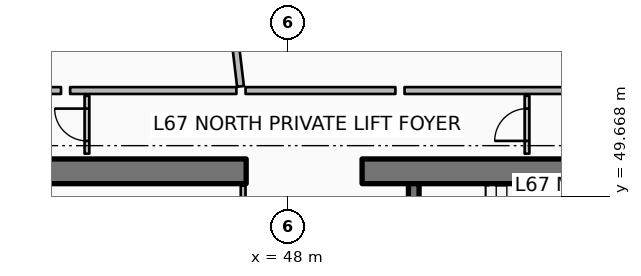
"""IFC4 building model, lengths in metres.
Left out: names, types, materials, properties, quantities, classifications, styles, units other than length and angle.
Written with IfcOpenShell. Run it as: python <this file> out.ifc"""

import sys

from ifc_helpers import new_model, si_unit, direction, frame, frame_2d, origin, place, context, subcontext, project, spatial, rectangle, extrude, element, fill, save


model = new_model("IFC4")
c1 = context("Model", 3, precision=1e-05, world=origin(), true_north=direction((0.0, 1.0)))
c2 = subcontext(c1, "Body", "Model", "MODEL_VIEW")
j1 = project(units=[si_unit("LENGTHUNIT", "METRE"), si_unit("PLANEANGLEUNIT", "RADIAN")], contexts=[c1])
p1 = place(None, origin())
s1 = spatial("IfcSite", under=j1, at=p1, CompositionType="ELEMENT")
p2 = place(p1, origin())
s2 = spatial("IfcBuilding", under=s1, at=p2, CompositionType="ELEMENT")
p3 = place(p2, frame((0.0, 0.0, 267.5)))
s3 = spatial("IfcBuildingStorey", under=s2, at=p3, CompositionType="ELEMENT", Elevation=267.5)
for number, where, z_axis, x_axis in (
    (1, (37.15, 50.325, 0.0), (0.0, 0.0, 1.0), (1.0, 0.0, 0.0)),
    (2, (49.95, 50.325, 0.0), (0.0, 0.0, 1.0), (1.0, 0.0, 0.0)),
):
    element("IfcWall", number, at=place(p3, frame(where, z_axis=z_axis, x_axis=x_axis)), inside=s3, PredefinedType="SHEAR", context=c2, shape_type="SweptSolid", body=[
        extrude(rectangle(XDim=9.75, YDim=0.65, at=frame_2d((4.875, 0.0))), origin(), (0.0, 0.0, 1.0), 3.85),
    ])
p4 = place(p3, frame((51.31, 46.5, 0.0), z_axis=(0.0, 0.0, 1.0), x_axis=(0.0, 1.0, 0.0)))
e3 = element("IfcWall", 3, at=p4, inside=s3, PredefinedType="SHEAR", context=c2, shape_type="SweptSolid", body=[
    extrude(rectangle(XDim=3.5, YDim=0.28, at=frame_2d((1.75, 0.0))), origin(), (0.0, 0.0, 1.0), 3.85),
])
p5 = place(p3, frame((46.82, 47.92, 0.0), z_axis=(0.0, 0.0, 1.0), x_axis=(0.0, 1.0, 0.0)))
e4 = element("IfcWall", 4, at=p5, inside=s3, PredefinedType="PARTITIONING", context=c2, shape_type="SweptSolid", body=[
    extrude(rectangle(XDim=2.03, YDim=0.125, at=frame_2d((1.015, 0.0))), origin(), (0.0, 0.0, 1.0), 3.03),
])
p6 = place(p3, frame((42.71, 50.79, 0.0), z_axis=(0.0, 0.0, 1.0), x_axis=(0.0, 1.0, 0.0)))
e5 = element("IfcWall", 5, at=p6, inside=s3, PredefinedType="PARTITIONING", context=c2, shape_type="SweptSolid", body=[
    extrude(rectangle(XDim=1.52, YDim=0.125, at=frame_2d((0.76, 0.0))), origin(), (0.0, 0.0, 1.0), 2.957),
])
p7 = place(p6, frame((0.335, 0.0, 0.0)))
e6 = element("IfcOpeningElement", 6, at=p7, cuts=e5, PredefinedType="OPENING", context=c2, shape_type="SweptSolid", body=[
    extrude(rectangle(XDim=0.85, YDim=2.06, at=frame_2d((0.425, 1.03))), frame((0.0, 0.073, 0.0), z_axis=(0.0, -1.0, 0.0), x_axis=(1.0, 0.0, 0.0)), (0.0, 0.0, 1.0), 0.145),
])
p8 = place(p3, frame((54.29, 50.79, 0.0), z_axis=(0.0, 0.0, 1.0), x_axis=(0.0, 1.0, 0.0)))
e7 = element("IfcWall", 7, at=p8, inside=s3, PredefinedType="PARTITIONING", context=c2, shape_type="SweptSolid", body=[
    extrude(rectangle(XDim=1.52, YDim=0.125, at=frame_2d((0.76, 0.0))), origin(), (0.0, 0.0, 1.0), 3.03),
])
p9 = place(p8, frame((0.335, 0.0, 0.0)))
e8 = element("IfcOpeningElement", 8, at=p9, cuts=e7, PredefinedType="OPENING", context=c2, shape_type="SweptSolid", body=[
    extrude(rectangle(XDim=0.85, YDim=2.06, at=frame_2d((0.425, 1.03))), frame((0.0, 0.073, 0.0), z_axis=(0.0, -1.0, 0.0), x_axis=(1.0, 0.0, 0.0)), (0.0, 0.0, 1.0), 0.145),
])
p10 = place(p3, frame((46.75, 52.559, 0.0), z_axis=(0.0, 0.0, 1.0), x_axis=(-0.117540318076, 0.993068111273, 0.0)))
e9 = element("IfcWall", 9, at=p10, inside=s3, PredefinedType="PARTITIONING", context=c2, shape_type="SweptSolid", body=[
    extrude(rectangle(XDim=14.062, YDim=0.18, at=frame_2d((7.031, 0.0))), origin(), (0.0, 0.0, 1.0), 2.957),
])
p11 = place(p3, frame((46.643, 52.45, 0.0), z_axis=(0.0, 0.0, 1.0), x_axis=(-1.0, 0.0, 0.0)))
e10 = element("IfcWall", 10, at=p11, inside=s3, PredefinedType="PARTITIONING", context=c2, shape_type="SweptSolid", body=[
    extrude(rectangle(XDim=4.376, YDim=0.18, at=frame_2d((2.188, 0.0))), origin(), (0.0, 0.0, 1.0), 2.957),
])
p12 = place(p3, frame((42.028, 52.45, 0.0), z_axis=(0.0, 0.0, 1.0), x_axis=(-1.0, 0.0, 0.0)))
e11 = element("IfcWall", 11, at=p12, inside=s3, PredefinedType="PARTITIONING", context=c2, shape_type="SweptSolid", body=[
    extrude(rectangle(XDim=4.758, YDim=0.18, at=frame_2d((2.379, 0.0))), origin(), (0.0, 0.0, 1.0), 2.957),
])
p13 = place(p3, frame((56.118, 52.45, 0.0), z_axis=(0.0, 0.0, 1.0), x_axis=(-1.0, 0.0, 0.0)))
e12 = element("IfcWall", 12, at=p13, inside=s3, PredefinedType="PARTITIONING", context=c2, shape_type="SweptSolid", body=[
    extrude(rectangle(XDim=5.051, YDim=0.18, at=frame_2d((2.525, 0.0))), origin(), (0.0, 0.0, 1.0), 2.957),
])
p14 = place(p3, frame((50.827, 52.45, 0.0), z_axis=(0.0, 0.0, 1.0), x_axis=(-1.0, 0.0, 0.0)))
e13 = element("IfcWall", 13, at=p14, inside=s3, PredefinedType="PARTITIONING", context=c2, shape_type="SweptSolid", body=[
    extrude(rectangle(XDim=3.944, YDim=0.18, at=frame_2d((1.972, 0.0))), origin(), (0.0, 0.0, 1.0), 2.957),
])
p15 = place(p7, origin())
e14 = element("IfcDoor", 14, at=p15, inside=s3, OperationType="SINGLE_SWING_RIGHT", PredefinedType="DOOR", context=c2, shape_type="SweptSolid", body=[
    extrude(rectangle(XDim=0.85, YDim=2.06, at=frame_2d((0.425, 1.03))), frame((0.0, 0.025, 0.0), z_axis=(0.0, -1.0, 0.0), x_axis=(1.0, 0.0, 0.0)), (0.0, 0.0, 1.0), 0.05),
])
fill(e6, e14)
p16 = place(p9, origin())
e15 = element("IfcDoor", 15, at=p16, inside=s3, OperationType="SINGLE_SWING_LEFT", PredefinedType="DOOR", context=c2, shape_type="SweptSolid", body=[
    extrude(rectangle(XDim=0.85, YDim=2.06, at=frame_2d((0.425, 1.03))), frame((0.0, 0.025, 0.0), z_axis=(0.0, -1.0, 0.0), x_axis=(1.0, 0.0, 0.0)), (0.0, 0.0, 1.0), 0.05),
])
fill(e8, e15)
save(model, sys.argv[1])
